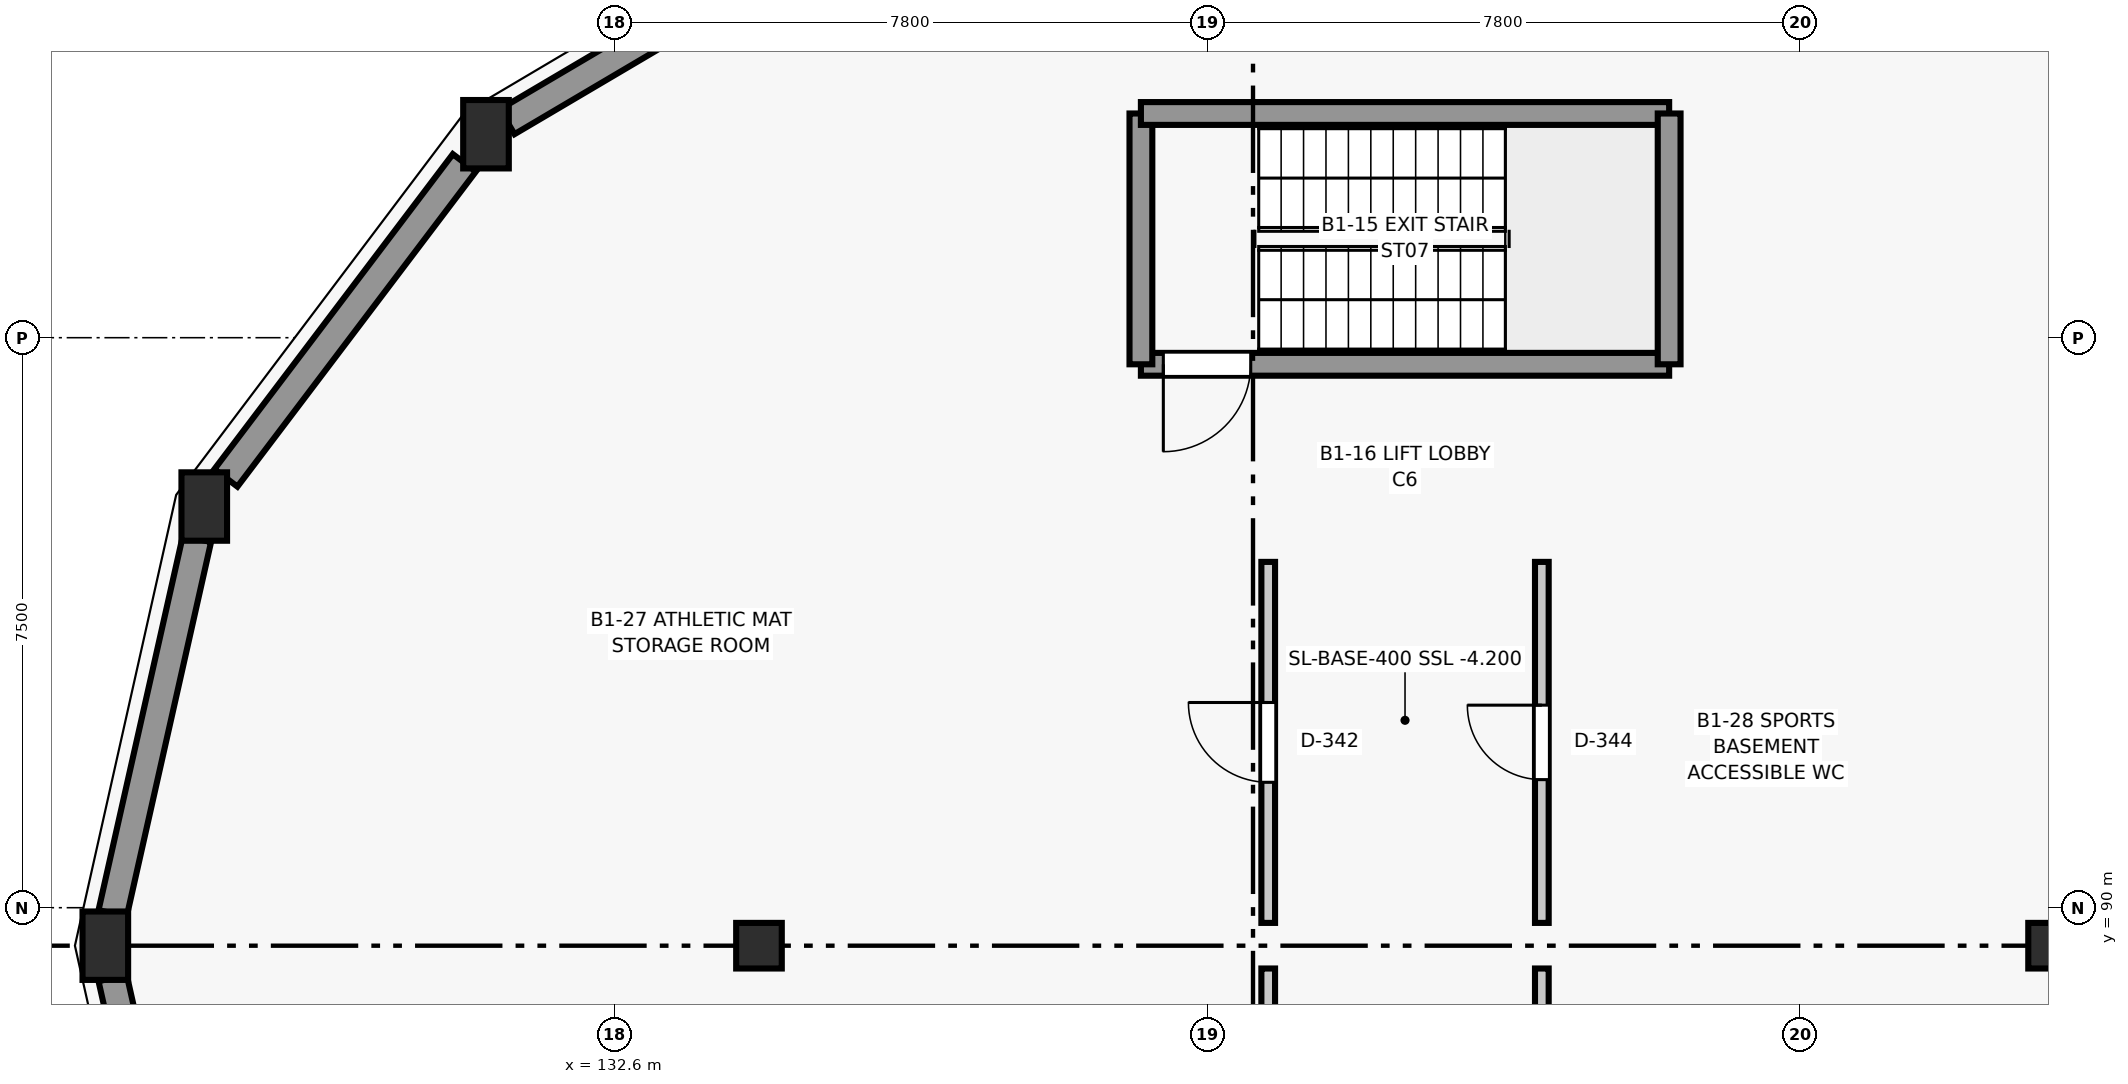
"""IFC4 building model, lengths in metres.
Left out: names, types, materials, properties, quantities, classifications, styles, units other than length and angle.
Written with IfcOpenShell. Run it as: python <this file> out.ifc"""

import sys

from ifc_helpers import new_model, si_unit, direction, frame, frame_2d, origin, origin_2d, place, context, subcontext, project, spatial, rectangle, circle, extrude, element, fill, save


model = new_model("IFC4")
c1 = context("Model", 3, precision=1e-05, world=origin(), true_north=direction((0.0, 1.0)))
c2 = subcontext(c1, "Body", "Model", "MODEL_VIEW")
j1 = project(units=[si_unit("LENGTHUNIT", "METRE"), si_unit("PLANEANGLEUNIT", "RADIAN")], contexts=[c1])
p1 = place(None, origin())
s1 = spatial("IfcSite", under=j1, at=p1, CompositionType="ELEMENT")
p2 = place(p1, origin())
s2 = spatial("IfcBuilding", under=s1, at=p2, CompositionType="ELEMENT")
p3 = place(p2, frame((0.0, 0.0, -4.2)))
s3 = spatial("IfcBuildingStorey", under=s2, at=p3, CompositionType="ELEMENT", Elevation=-4.2)
for number, where, z_axis, x_axis in (
    (1, (134.5, 89.5, 0.0), (0.0, 0.0, 1.0), (1.0, 0.0, 0.0)),
    (2, (151.5, 89.5, 0.0), (0.0, 0.0, 1.0), (1.0, 0.0, 0.0)),
):
    element("IfcColumn", number, at=place(p3, frame(where, z_axis=z_axis, x_axis=x_axis)), inside=s3, PredefinedType="COLUMN", context=c2, shape_type="SweptSolid", body=[
        extrude(circle(Radius=0.3, at=origin_2d()), origin(), (0.0, 0.0, 1.0), 4.2),
    ])
for number, where, z_axis, x_axis in (
    (3, (130.908, 100.177, 0.0), (0.0, 0.0, 1.0), (1.0, 0.0, 0.0)),
    (4, (127.202, 95.279, 0.0), (0.0, 0.0, 1.0), (1.0, 0.0, 0.0)),
    (5, (125.9, 89.5, 0.0), (0.0, 0.0, 1.0), (1.0, 0.0, 0.0)),
):
    element("IfcColumn", number, at=place(p3, frame(where, z_axis=z_axis, x_axis=x_axis)), inside=s3, PredefinedType="COLUMN", context=c2, shape_type="SweptSolid", body=[
        extrude(rectangle(XDim=0.6, YDim=0.9, at=origin_2d()), origin(), (0.0, 0.0, 1.0), 4.2),
    ])
for number, where, z_axis, x_axis in (
    (6, (149.823, 103.286, 0.0), (0.0, 0.0, 1.0), (0.861, -0.508, 0.0)),
    (7, (131.187, 100.342, 0.0), (0.0, 0.0, 1.0), (0.861, 0.508, 0.0)),
):
    element("IfcWall", number, at=place(p3, frame(where, z_axis=z_axis, x_axis=x_axis)), inside=s3, PredefinedType="SHEAR", context=c2, shape_type="SweptSolid", body=[
        extrude(rectangle(XDim=5.794, YDim=0.38, at=frame_2d((2.897, 0.0))), origin(), (0.0, 0.0, 1.0), 3.92),
    ])
p4 = place(p3, frame((127.487, 95.655, 0.0), z_axis=(0.0, 0.0, 1.0), x_axis=(0.603398282319, 0.797439974477, 0.0)))
e8 = element("IfcWall", 8, at=p4, inside=s3, PredefinedType="SHEAR", context=c2, shape_type="SweptSolid", body=[
    extrude(rectangle(XDim=5.199, YDim=0.38, at=frame_2d((2.599, 0.0))), origin(), (0.0, 0.0, 1.0), 3.92),
])
for number, where, z_axis, x_axis in (
    (9, (125.996, 89.926, 0.0), (0.0, 0.0, 1.0), (0.22, 0.976, 0.0)),
    (10, (127.106, 84.147, 0.0), (0.0, 0.0, 1.0), (-0.22, 0.976, 0.0)),
):
    element("IfcWall", number, at=place(p3, frame(where, z_axis=z_axis, x_axis=x_axis)), inside=s3, PredefinedType="SHEAR", context=c2, shape_type="SweptSolid", body=[
        extrude(rectangle(XDim=5.051, YDim=0.38, at=frame_2d((2.525, 0.0))), origin(), (0.0, 0.0, 1.0), 3.92),
    ])
p5 = place(p3, frame((146.475, 97.15, 0.0), z_axis=(0.0, 0.0, 1.0), x_axis=(-1.0, 0.0, 0.0)))
e11 = element("IfcWall", 11, at=p5, inside=s3, PredefinedType="SHEAR", context=c2, shape_type="SweptSolid", body=[
    extrude(rectangle(XDim=6.95, YDim=0.3, at=frame_2d((3.475, 0.0))), origin(), (0.0, 0.0, 1.0), 4.2),
])
p6 = place(p5, frame((5.505, 0.0, 0.0)))
e12 = element("IfcOpeningElement", 12, at=p6, cuts=e11, PredefinedType="OPENING", context=c2, shape_type="SweptSolid", body=[
    extrude(rectangle(XDim=1.15, YDim=2.15, at=frame_2d((0.575, 1.075))), frame((0.0, 0.16, 0.0), z_axis=(0.0, -1.0, 0.0), x_axis=(1.0, 0.0, 0.0)), (0.0, 0.0, 1.0), 0.32),
])
p7 = place(p3, frame((139.525, 97.15, 0.0), z_axis=(0.0, 0.0, 1.0), x_axis=(0.0, 1.0, 0.0)))
e13 = element("IfcWall", 13, at=p7, inside=s3, PredefinedType="SHEAR", context=c2, shape_type="SweptSolid", body=[
    extrude(rectangle(XDim=3.3, YDim=0.3, at=frame_2d((1.65, 0.0))), origin(), (0.0, 0.0, 1.0), 4.2),
])
p8 = place(p3, frame((139.525, 100.45, 0.0), z_axis=(0.0, 0.0, 1.0), x_axis=(1.0, 0.0, 0.0)))
e14 = element("IfcWall", 14, at=p8, inside=s3, PredefinedType="SHEAR", context=c2, shape_type="SweptSolid", body=[
    extrude(rectangle(XDim=6.95, YDim=0.3, at=frame_2d((3.475, 0.0))), origin(), (0.0, 0.0, 1.0), 4.2),
])
p9 = place(p3, frame((146.475, 100.45, 0.0), z_axis=(0.0, 0.0, 1.0), x_axis=(0.0, -1.0, 0.0)))
e15 = element("IfcWall", 15, at=p9, inside=s3, PredefinedType="SHEAR", context=c2, shape_type="SweptSolid", body=[
    extrude(rectangle(XDim=3.3, YDim=0.3, at=frame_2d((1.65, 0.0))), origin(), (0.0, 0.0, 1.0), 4.2),
])
p10 = place(p3, frame((141.2, 76.0, 0.0), z_axis=(0.0, 0.0, 1.0), x_axis=(0.0, 1.0, 0.0)))
e16 = element("IfcWall", 16, at=p10, inside=s3, PredefinedType="PARTITIONING", context=c2, shape_type="SweptSolid", body=[
    extrude(rectangle(XDim=13.2, YDim=0.18, at=frame_2d((6.6, 0.0))), origin(), (0.0, 0.0, 1.0), 3.915),
])
p11 = place(p10, frame((5.875, 0.0, 0.0)))
e17 = element("IfcOpeningElement", 17, at=p11, cuts=e16, PredefinedType="OPENING", context=c2, shape_type="SweptSolid", body=[
    extrude(rectangle(XDim=1.45, YDim=2.2, at=frame_2d((0.725, 1.1))), frame((0.0, 0.1, 0.0), z_axis=(0.0, -1.0, 0.0), x_axis=(1.0, 0.0, 0.0)), (0.0, 0.0, 1.0), 0.2),
])
p12 = place(p3, frame((141.2, 89.8, 0.0), z_axis=(0.0, 0.0, 1.0), x_axis=(0.0, 1.0, 0.0)))
e18 = element("IfcWall", 18, at=p12, inside=s3, PredefinedType="PARTITIONING", context=c2, shape_type="SweptSolid", body=[
    extrude(rectangle(XDim=4.75, YDim=0.18, at=frame_2d((2.375, 0.0))), origin(), (0.0, 0.0, 1.0), 3.915),
])
p13 = place(p12, frame((1.85, 0.0, 0.0)))
e19 = element("IfcOpeningElement", 19, at=p13, cuts=e18, PredefinedType="OPENING", context=c2, shape_type="SweptSolid", body=[
    extrude(rectangle(XDim=1.05, YDim=2.1, at=frame_2d((0.525, 1.05))), frame((0.0, 0.1, 0.0), z_axis=(0.0, -1.0, 0.0), x_axis=(1.0, 0.0, 0.0)), (0.0, 0.0, 1.0), 0.2),
])
p14 = place(p3, frame((144.8, 76.0, 0.0), z_axis=(0.0, 0.0, 1.0), x_axis=(0.0, 1.0, 0.0)))
e20 = element("IfcWall", 20, at=p14, inside=s3, PredefinedType="PARTITIONING", context=c2, shape_type="SweptSolid", body=[
    extrude(rectangle(XDim=13.2, YDim=0.18, at=frame_2d((6.6, 0.0))), origin(), (0.0, 0.0, 1.0), 3.915),
])
p15 = place(p14, frame((5.875, 0.0, 0.0)))
e21 = element("IfcOpeningElement", 21, at=p15, cuts=e20, PredefinedType="OPENING", context=c2, shape_type="SweptSolid", body=[
    extrude(rectangle(XDim=1.45, YDim=2.2, at=frame_2d((0.725, 1.1))), frame((0.0, 0.1, 0.0), z_axis=(0.0, -1.0, 0.0), x_axis=(1.0, 0.0, 0.0)), (0.0, 0.0, 1.0), 0.2),
])
p16 = place(p3, frame((144.8, 89.8, 0.0), z_axis=(0.0, 0.0, 1.0), x_axis=(0.0, 1.0, 0.0)))
e22 = element("IfcWall", 22, at=p16, inside=s3, PredefinedType="PARTITIONING", context=c2, shape_type="SweptSolid", body=[
    extrude(rectangle(XDim=4.75, YDim=0.18, at=frame_2d((2.375, 0.0))), origin(), (0.0, 0.0, 1.0), 3.915),
])
p17 = place(p16, frame((1.885, 0.0, 0.0)))
e23 = element("IfcOpeningElement", 23, at=p17, cuts=e22, PredefinedType="OPENING", context=c2, shape_type="SweptSolid", body=[
    extrude(rectangle(XDim=0.98, YDim=2.1, at=frame_2d((0.49, 1.05))), frame((0.0, 0.1, 0.0), z_axis=(0.0, -1.0, 0.0), x_axis=(1.0, 0.0, 0.0)), (0.0, 0.0, 1.0), 0.2),
])
p18 = place(p6, origin())
e24 = element("IfcDoor", 24, at=p18, inside=s3, OperationType="SINGLE_SWING_RIGHT", PredefinedType="DOOR", context=c2, shape_type="SweptSolid", body=[
    extrude(rectangle(XDim=1.15, YDim=2.15, at=frame_2d((0.575, 1.075))), frame((0.0, 0.025, 0.0), z_axis=(0.0, -1.0, 0.0), x_axis=(1.0, 0.0, 0.0)), (0.0, 0.0, 1.0), 0.05),
])
fill(e12, e24)
p19 = place(p13, origin())
e25 = element("IfcDoor", 25, at=p19, inside=s3, OperationType="SINGLE_SWING_RIGHT", PredefinedType="DOOR", context=c2, shape_type="SweptSolid", body=[
    extrude(rectangle(XDim=1.05, YDim=2.1, at=frame_2d((0.525, 1.05))), frame((0.0, 0.025, 0.0), z_axis=(0.0, -1.0, 0.0), x_axis=(1.0, 0.0, 0.0)), (0.0, 0.0, 1.0), 0.05),
])
fill(e19, e25)
p20 = place(p17, origin())
e26 = element("IfcDoor", 26, at=p20, inside=s3, OperationType="SINGLE_SWING_RIGHT", PredefinedType="DOOR", context=c2, shape_type="SweptSolid", body=[
    extrude(rectangle(XDim=0.98, YDim=2.1, at=frame_2d((0.49, 1.05))), frame((0.0, 0.025, 0.0), z_axis=(0.0, -1.0, 0.0), x_axis=(1.0, 0.0, 0.0)), (0.0, 0.0, 1.0), 0.05),
])
fill(e23, e26)
save(model, sys.argv[1])
